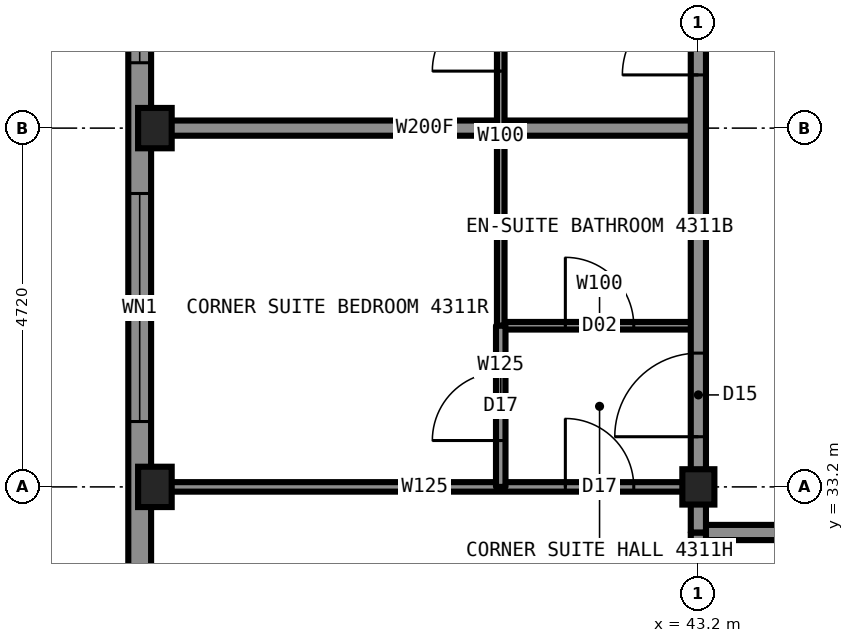
"""IFC4 building model, lengths in metres.
Left out: names, types, materials, properties, quantities, classifications, styles, units other than length and angle.
Written with IfcOpenShell. Run it as: python <this file> out.ifc"""

import sys

from ifc_helpers import new_model, si_unit, direction, frame, frame_2d, origin, origin_2d, place, context, subcontext, project, spatial, rectangle, i_section, extrude, element, fill, save


model = new_model("IFC4")
c1 = context("Model", 3, precision=1e-05, world=origin(), true_north=direction((0.0, 1.0)))
c2 = subcontext(c1, "Body", "Model", "MODEL_VIEW")
j1 = project(units=[si_unit("LENGTHUNIT", "METRE"), si_unit("PLANEANGLEUNIT", "RADIAN")], contexts=[c1])
p1 = place(None, origin())
s1 = spatial("IfcSite", under=j1, at=p1, CompositionType="ELEMENT")
p2 = place(p1, origin())
s2 = spatial("IfcBuilding", under=s1, at=p2, CompositionType="ELEMENT")
p3 = place(p2, frame((0.0, 0.0, 161.8)))
s3 = spatial("IfcBuildingStorey", under=s2, at=p3, CompositionType="ELEMENT", Elevation=161.8)
for number, where, z_axis, x_axis in (
    (1, (36.05, 33.2, 0.0), (0.0, 0.0, 1.0), (1.0, 0.0, 0.0)),
    (2, (36.05, 37.92, 0.0), (0.0, 0.0, 1.0), (1.0, 0.0, 0.0)),
):
    element("IfcColumn", number, at=place(p3, frame(where, z_axis=z_axis, x_axis=x_axis)), inside=s3, PredefinedType="COLUMN", context=c2, shape_type="SweptSolid", body=[
        extrude(i_section(OverallWidth=0.442, OverallDepth=0.531, WebThickness=0.066, FlangeThickness=0.106, at=origin_2d()), origin(), (0.0, 0.0, 1.0), 3.5),
    ])
p4 = place(p3, frame((43.2, 33.2, 0.0), z_axis=(0.0, 0.0, 1.0), x_axis=(1.0, 0.0, 0.0)))
e3 = element("IfcColumn", 3, at=p4, inside=s3, PredefinedType="COLUMN", context=c2, shape_type="SweptSolid", body=[
    extrude(i_section(OverallWidth=0.422, OverallDepth=0.465, WebThickness=0.045, FlangeThickness=0.073, at=origin_2d()), origin(), (0.0, 0.0, 1.0), 3.5),
])
p5 = place(p3, frame((36.0, 33.2, 0.0), z_axis=(0.0, 0.0, 1.0), x_axis=(1.0, 0.0, 0.0)))
e4 = element("IfcWall", 4, at=p5, inside=s3, PredefinedType="PARTITIONING", context=c2, shape_type="SweptSolid", body=[
    extrude(rectangle(XDim=7.2, YDim=0.125, at=frame_2d((3.6, 0.0))), origin(), (0.0, 0.0, 1.0), 2.573),
])
p6 = place(p5, frame((5.45, 0.0, 0.0)))
e5 = element("IfcOpeningElement", 5, at=p6, cuts=e4, PredefinedType="OPENING", context=c2, shape_type="SweptSolid", body=[
    extrude(rectangle(XDim=0.9, YDim=2.2, at=frame_2d((0.45, 1.1))), frame((0.0, 0.073, 0.0), z_axis=(0.0, -1.0, 0.0), x_axis=(1.0, 0.0, 0.0)), (0.0, 0.0, 1.0), 0.145),
])
p7 = place(p3, frame((43.2, 32.6, 0.0), z_axis=(0.0, 0.0, 1.0), x_axis=(1.0, 0.0, 0.0)))
e6 = element("IfcWall", 6, at=p7, inside=s3, PredefinedType="PARTITIONING", context=c2, shape_type="SweptSolid", body=[
    extrude(rectangle(XDim=23.6, YDim=0.2, at=frame_2d((11.8, 0.0))), origin(), (0.0, 0.0, 1.0), 3.33),
])
p8 = place(p7, frame((3.0, 0.0, 0.0)))
e7 = element("IfcOpeningElement", 7, at=p8, cuts=e6, PredefinedType="OPENING", context=c2, shape_type="SweptSolid", body=[
    extrude(rectangle(XDim=1.0, YDim=2.2, at=frame_2d((0.5, 1.1))), frame((0.0, 0.11, 0.0), z_axis=(0.0, -1.0, 0.0), x_axis=(1.0, 0.0, 0.0)), (0.0, 0.0, 1.0), 0.22),
])
p9 = place(p7, frame((11.7, 0.0, 0.0)))
e8 = element("IfcOpeningElement", 8, at=p9, cuts=e6, PredefinedType="OPENING", context=c2, shape_type="SweptSolid", body=[
    extrude(rectangle(XDim=1.0, YDim=2.2, at=frame_2d((0.5, 1.1))), frame((0.0, 0.11, 0.0), z_axis=(0.0, -1.0, 0.0), x_axis=(1.0, 0.0, 0.0)), (0.0, 0.0, 1.0), 0.22),
])
p10 = place(p7, frame((17.16, 0.0, 0.0)))
e9 = element("IfcOpeningElement", 9, at=p10, cuts=e6, PredefinedType="OPENING", context=c2, shape_type="SweptSolid", body=[
    extrude(rectangle(XDim=1.0, YDim=2.2, at=frame_2d((0.5, 1.1))), frame((0.0, 0.11, 0.0), z_axis=(0.0, -1.0, 0.0), x_axis=(1.0, 0.0, 0.0)), (0.0, 0.0, 1.0), 0.22),
])
p11 = place(p3, frame((36.0, 37.92, 0.0), z_axis=(0.0, 0.0, 1.0), x_axis=(1.0, 0.0, 0.0)))
e10 = element("IfcWall", 10, at=p11, inside=s3, PredefinedType="PARTITIONING", context=c2, shape_type="SweptSolid", body=[
    extrude(rectangle(XDim=7.2, YDim=0.2, at=frame_2d((3.6, 0.0))), origin(), (0.0, 0.0, 1.0), 2.573),
])
p12 = place(p3, frame((40.6, 35.32, 0.0), z_axis=(0.0, 0.0, 1.0), x_axis=(1.0, 0.0, 0.0)))
e11 = element("IfcWall", 11, at=p12, inside=s3, PredefinedType="PARTITIONING", context=c2, shape_type="SweptSolid", body=[
    extrude(rectangle(XDim=2.6, YDim=0.1, at=frame_2d((1.3, 0.0))), origin(), (0.0, 0.0, 1.0), 3.33),
])
p13 = place(p12, frame((0.85, 0.0, 0.0)))
e12 = element("IfcOpeningElement", 12, at=p13, cuts=e11, PredefinedType="OPENING", context=c2, shape_type="SweptSolid", body=[
    extrude(rectangle(XDim=0.9, YDim=2.1, at=frame_2d((0.45, 1.05))), frame((0.0, 0.06, 0.0), z_axis=(0.0, -1.0, 0.0), x_axis=(1.0, 0.0, 0.0)), (0.0, 0.0, 1.0), 0.12),
])
p14 = place(p3, frame((43.2, 33.22, 0.0), z_axis=(0.0, 0.0, 1.0), x_axis=(0.0, 1.0, 0.0)))
e13 = element("IfcWall", 13, at=p14, inside=s3, PredefinedType="PARTITIONING", context=c2, shape_type="SweptSolid", body=[
    extrude(rectangle(XDim=23.56, YDim=0.2, at=frame_2d((11.78, 0.0))), origin(), (0.0, 0.0, 1.0), 3.33),
])
p15 = place(p14, frame((15.6, 0.0, 0.0)))
e14 = element("IfcOpeningElement", 14, at=p15, cuts=e13, PredefinedType="OPENING", context=c2, shape_type="SweptSolid", body=[
    extrude(rectangle(XDim=1.0, YDim=2.2, at=frame_2d((0.5, 1.1))), frame((0.0, 0.11, 0.0), z_axis=(0.0, -1.0, 0.0), x_axis=(1.0, 0.0, 0.0)), (0.0, 0.0, 1.0), 0.22),
])
p16 = place(p14, frame((22.03, 0.0, 0.0)))
e15 = element("IfcOpeningElement", 15, at=p16, cuts=e13, PredefinedType="OPENING", context=c2, shape_type="SweptSolid", body=[
    extrude(rectangle(XDim=1.1, YDim=2.2, at=frame_2d((0.55, 1.1))), frame((0.0, 0.11, 0.0), z_axis=(0.0, -1.0, 0.0), x_axis=(1.0, 0.0, 0.0)), (0.0, 0.0, 1.0), 0.22),
])
p17 = place(p14, frame((0.64, 0.0, 0.0)))
e16 = element("IfcOpeningElement", 16, at=p17, cuts=e13, PredefinedType="OPENING", context=c2, shape_type="SweptSolid", body=[
    extrude(rectangle(XDim=1.1, YDim=2.2, at=frame_2d((0.55, 1.1))), frame((0.0, 0.11, 0.0), z_axis=(0.0, -1.0, 0.0), x_axis=(1.0, 0.0, 0.0)), (0.0, 0.0, 1.0), 0.22),
])
p18 = place(p14, frame((7.45, 0.0, 0.0)))
e17 = element("IfcOpeningElement", 17, at=p18, cuts=e13, PredefinedType="OPENING", context=c2, shape_type="SweptSolid", body=[
    extrude(rectangle(XDim=2.0, YDim=2.4, at=frame_2d((1.0, 1.2))), frame((0.0, 0.11, 0.0), z_axis=(0.0, -1.0, 0.0), x_axis=(1.0, 0.0, 0.0)), (0.0, 0.0, 1.0), 0.22),
])
p19 = place(p14, frame((5.4, 0.0, 0.0)))
e18 = element("IfcOpeningElement", 18, at=p19, cuts=e13, PredefinedType="OPENING", context=c2, shape_type="SweptSolid", body=[
    extrude(rectangle(XDim=1.0, YDim=2.1, at=frame_2d((0.5, 1.05))), frame((0.0, 0.11, 0.0), z_axis=(0.0, -1.0, 0.0), x_axis=(1.0, 0.0, 0.0)), (0.0, 0.0, 1.0), 0.22),
])
p20 = place(p3, frame((43.2, 26.0, 0.0), z_axis=(0.0, 0.0, 1.0), x_axis=(0.0, 1.0, 0.0)))
e19 = element("IfcWall", 19, at=p20, inside=s3, PredefinedType="PARTITIONING", context=c2, shape_type="SweptSolid", body=[
    extrude(rectangle(XDim=6.6, YDim=0.2, at=frame_2d((3.3, 0.0))), origin(), (0.0, 0.0, 1.0), 2.573),
])
p21 = place(p3, frame((40.6, 35.32, 0.0), z_axis=(0.0, 0.0, 1.0), x_axis=(0.0, 1.0, 0.0)))
e20 = element("IfcWall", 20, at=p21, inside=s3, PredefinedType="PARTITIONING", context=c2, shape_type="SweptSolid", body=[
    extrude(rectangle(XDim=5.0, YDim=0.1, at=frame_2d((2.5, 0.0))), origin(), (0.0, 0.0, 1.0), 3.33),
])
p22 = place(p21, frame((3.35, 0.0, 0.0)))
e21 = element("IfcOpeningElement", 21, at=p22, cuts=e20, PredefinedType="OPENING", context=c2, shape_type="SweptSolid", body=[
    extrude(rectangle(XDim=0.9, YDim=2.2, at=frame_2d((0.45, 1.1))), frame((0.0, 0.06, 0.0), z_axis=(0.0, -1.0, 0.0), x_axis=(1.0, 0.0, 0.0)), (0.0, 0.0, 1.0), 0.12),
])
p23 = place(p3, frame((40.6, 33.2, 0.0), z_axis=(0.0, 0.0, 1.0), x_axis=(0.0, 1.0, 0.0)))
e22 = element("IfcWall", 22, at=p23, inside=s3, PredefinedType="PARTITIONING", context=c2, shape_type="SweptSolid", body=[
    extrude(rectangle(XDim=2.12, YDim=0.125, at=frame_2d((1.06, 0.0))), origin(), (0.0, 0.0, 1.0), 3.33),
])
p24 = place(p23, frame((0.61, 0.0, 0.0)))
e23 = element("IfcOpeningElement", 23, at=p24, cuts=e22, PredefinedType="OPENING", context=c2, shape_type="SweptSolid", body=[
    extrude(rectangle(XDim=0.9, YDim=2.2, at=frame_2d((0.45, 1.1))), frame((0.0, 0.073, 0.0), z_axis=(0.0, -1.0, 0.0), x_axis=(1.0, 0.0, 0.0)), (0.0, 0.0, 1.0), 0.145),
])
p25 = place(p3, frame((35.85, 58.8, 0.0), z_axis=(0.0, 0.0, 1.0), x_axis=(0.0, -1.0, 0.0)))
e24 = element("IfcWall", 24, at=p25, inside=s3, PredefinedType="SOLIDWALL", context=c2, shape_type="SweptSolid", body=[
    extrude(rectangle(XDim=27.6, YDim=0.3, at=frame_2d((13.8, 0.0))), origin(), (0.0, 0.0, 1.0), 2.83),
])
p26 = place(p25, frame((2.86, 0.0, 0.3)))
e25 = element("IfcOpeningElement", 25, at=p26, cuts=e24, PredefinedType="OPENING", context=c2, shape_type="SweptSolid", body=[
    extrude(rectangle(XDim=3.0, YDim=2.0, at=frame_2d((1.5, 1.0))), frame((0.0, 0.16, 0.0), z_axis=(0.0, -1.0, 0.0), x_axis=(1.0, 0.0, 0.0)), (0.0, 0.0, 1.0), 0.32),
])
p27 = place(p25, frame((7.58, 0.0, 0.3)))
e26 = element("IfcOpeningElement", 26, at=p27, cuts=e24, PredefinedType="OPENING", context=c2, shape_type="SweptSolid", body=[
    extrude(rectangle(XDim=3.0, YDim=2.0, at=frame_2d((1.5, 1.0))), frame((0.0, 0.16, 0.0), z_axis=(0.0, -1.0, 0.0), x_axis=(1.0, 0.0, 0.0)), (0.0, 0.0, 1.0), 0.32),
])
p28 = place(p25, frame((12.3, 0.0, 0.3)))
e27 = element("IfcOpeningElement", 27, at=p28, cuts=e24, PredefinedType="OPENING", context=c2, shape_type="SweptSolid", body=[
    extrude(rectangle(XDim=3.0, YDim=2.0, at=frame_2d((1.5, 1.0))), frame((0.0, 0.16, 0.0), z_axis=(0.0, -1.0, 0.0), x_axis=(1.0, 0.0, 0.0)), (0.0, 0.0, 1.0), 0.32),
])
p29 = place(p25, frame((17.02, 0.0, 0.3)))
e28 = element("IfcOpeningElement", 28, at=p29, cuts=e24, PredefinedType="OPENING", context=c2, shape_type="SweptSolid", body=[
    extrude(rectangle(XDim=3.0, YDim=2.0, at=frame_2d((1.5, 1.0))), frame((0.0, 0.16, 0.0), z_axis=(0.0, -1.0, 0.0), x_axis=(1.0, 0.0, 0.0)), (0.0, 0.0, 1.0), 0.32),
])
p30 = place(p25, frame((21.74, 0.0, 0.3)))
e29 = element("IfcOpeningElement", 29, at=p30, cuts=e24, PredefinedType="OPENING", context=c2, shape_type="SweptSolid", body=[
    extrude(rectangle(XDim=3.0, YDim=2.0, at=frame_2d((1.5, 1.0))), frame((0.0, 0.16, 0.0), z_axis=(0.0, -1.0, 0.0), x_axis=(1.0, 0.0, 0.0)), (0.0, 0.0, 1.0), 0.32),
])
p31 = place(p3, frame((43.2, 32.6, 0.0), z_axis=(0.0, 0.0, 1.0), x_axis=(0.0, 1.0, 0.0)))
e30 = element("IfcWall", 30, at=p31, inside=s3, PredefinedType="PARTITIONING", context=c2, shape_type="SweptSolid", body=[
    extrude(rectangle(XDim=0.62, YDim=0.2, at=frame_2d((0.31, 0.0))), origin(), (0.0, 0.0, 1.0), 2.573),
])
p32 = place(p6, origin())
e31 = element("IfcDoor", 31, at=p32, inside=s3, OperationType="SINGLE_SWING_LEFT", PredefinedType="DOOR", context=c2, shape_type="SweptSolid", body=[
    extrude(rectangle(XDim=0.9, YDim=2.2, at=frame_2d((0.45, 1.1))), frame((0.0, 0.025, 0.0), z_axis=(0.0, -1.0, 0.0), x_axis=(1.0, 0.0, 0.0)), (0.0, 0.0, 1.0), 0.05),
])
fill(e5, e31)
p33 = place(p13, origin())
e32 = element("IfcDoor", 32, at=p33, inside=s3, OperationType="SINGLE_SWING_RIGHT", PredefinedType="DOOR", context=c2, shape_type="SweptSolid", body=[
    extrude(rectangle(XDim=0.9, YDim=2.1, at=frame_2d((0.45, 1.05))), frame((0.0, 0.025, 0.0), z_axis=(0.0, -1.0, 0.0), x_axis=(1.0, 0.0, 0.0)), (0.0, 0.0, 1.0), 0.05),
])
fill(e12, e32)
p34 = place(p17, origin())
e33 = element("IfcDoor", 33, at=p34, inside=s3, OperationType="SINGLE_SWING_LEFT", PredefinedType="DOOR", context=c2, shape_type="SweptSolid", body=[
    extrude(rectangle(XDim=1.1, YDim=2.2, at=frame_2d((0.55, 1.1))), frame((0.0, 0.025, 0.0), z_axis=(0.0, -1.0, 0.0), x_axis=(1.0, 0.0, 0.0)), (0.0, 0.0, 1.0), 0.05),
])
fill(e16, e33)
p35 = place(p24, origin())
e34 = element("IfcDoor", 34, at=p35, inside=s3, OperationType="SINGLE_SWING_LEFT", PredefinedType="DOOR", context=c2, shape_type="SweptSolid", body=[
    extrude(rectangle(XDim=0.9, YDim=2.2, at=frame_2d((0.45, 1.1))), frame((0.0, 0.025, 0.0), z_axis=(0.0, -1.0, 0.0), x_axis=(1.0, 0.0, 0.0)), (0.0, 0.0, 1.0), 0.05),
])
fill(e23, e34)
p36 = place(p22, origin())
e35 = element("IfcDoor", 35, at=p36, inside=s3, OperationType="SINGLE_SWING_LEFT", PredefinedType="DOOR", context=c2, shape_type="SweptSolid", body=[
    extrude(rectangle(XDim=0.9, YDim=2.2, at=frame_2d((0.45, 1.1))), frame((0.0, 0.025, 0.0), z_axis=(0.0, -1.0, 0.0), x_axis=(1.0, 0.0, 0.0)), (0.0, 0.0, 1.0), 0.05),
])
fill(e21, e35)
p37 = place(p19, origin())
e36 = element("IfcDoor", 36, at=p37, inside=s3, OperationType="SINGLE_SWING_LEFT", PredefinedType="DOOR", context=c2, shape_type="SweptSolid", body=[
    extrude(rectangle(XDim=1.0, YDim=2.1, at=frame_2d((0.5, 1.05))), frame((0.0, 0.025, 0.0), z_axis=(0.0, -1.0, 0.0), x_axis=(1.0, 0.0, 0.0)), (0.0, 0.0, 1.0), 0.05),
])
fill(e18, e36)
p38 = place(p29, origin())
e37 = element("IfcWindow", 37, at=p38, inside=s3, PartitioningType="SINGLE_PANEL", PredefinedType="WINDOW", context=c2, shape_type="SweptSolid", body=[
    extrude(rectangle(XDim=3.0, YDim=2.0, at=frame_2d((1.5, 1.0))), frame((0.0, 0.13, 0.0), z_axis=(0.0, -1.0, 0.0), x_axis=(1.0, 0.0, 0.0)), (0.0, 0.0, 1.0), 0.06),
])
fill(e28, e37)
p39 = place(p30, origin())
e38 = element("IfcWindow", 38, at=p39, inside=s3, PartitioningType="SINGLE_PANEL", PredefinedType="WINDOW", context=c2, shape_type="SweptSolid", body=[
    extrude(rectangle(XDim=3.0, YDim=2.0, at=frame_2d((1.5, 1.0))), frame((0.0, 0.13, 0.0), z_axis=(0.0, -1.0, 0.0), x_axis=(1.0, 0.0, 0.0)), (0.0, 0.0, 1.0), 0.06),
])
fill(e29, e38)
save(model, sys.argv[1])
